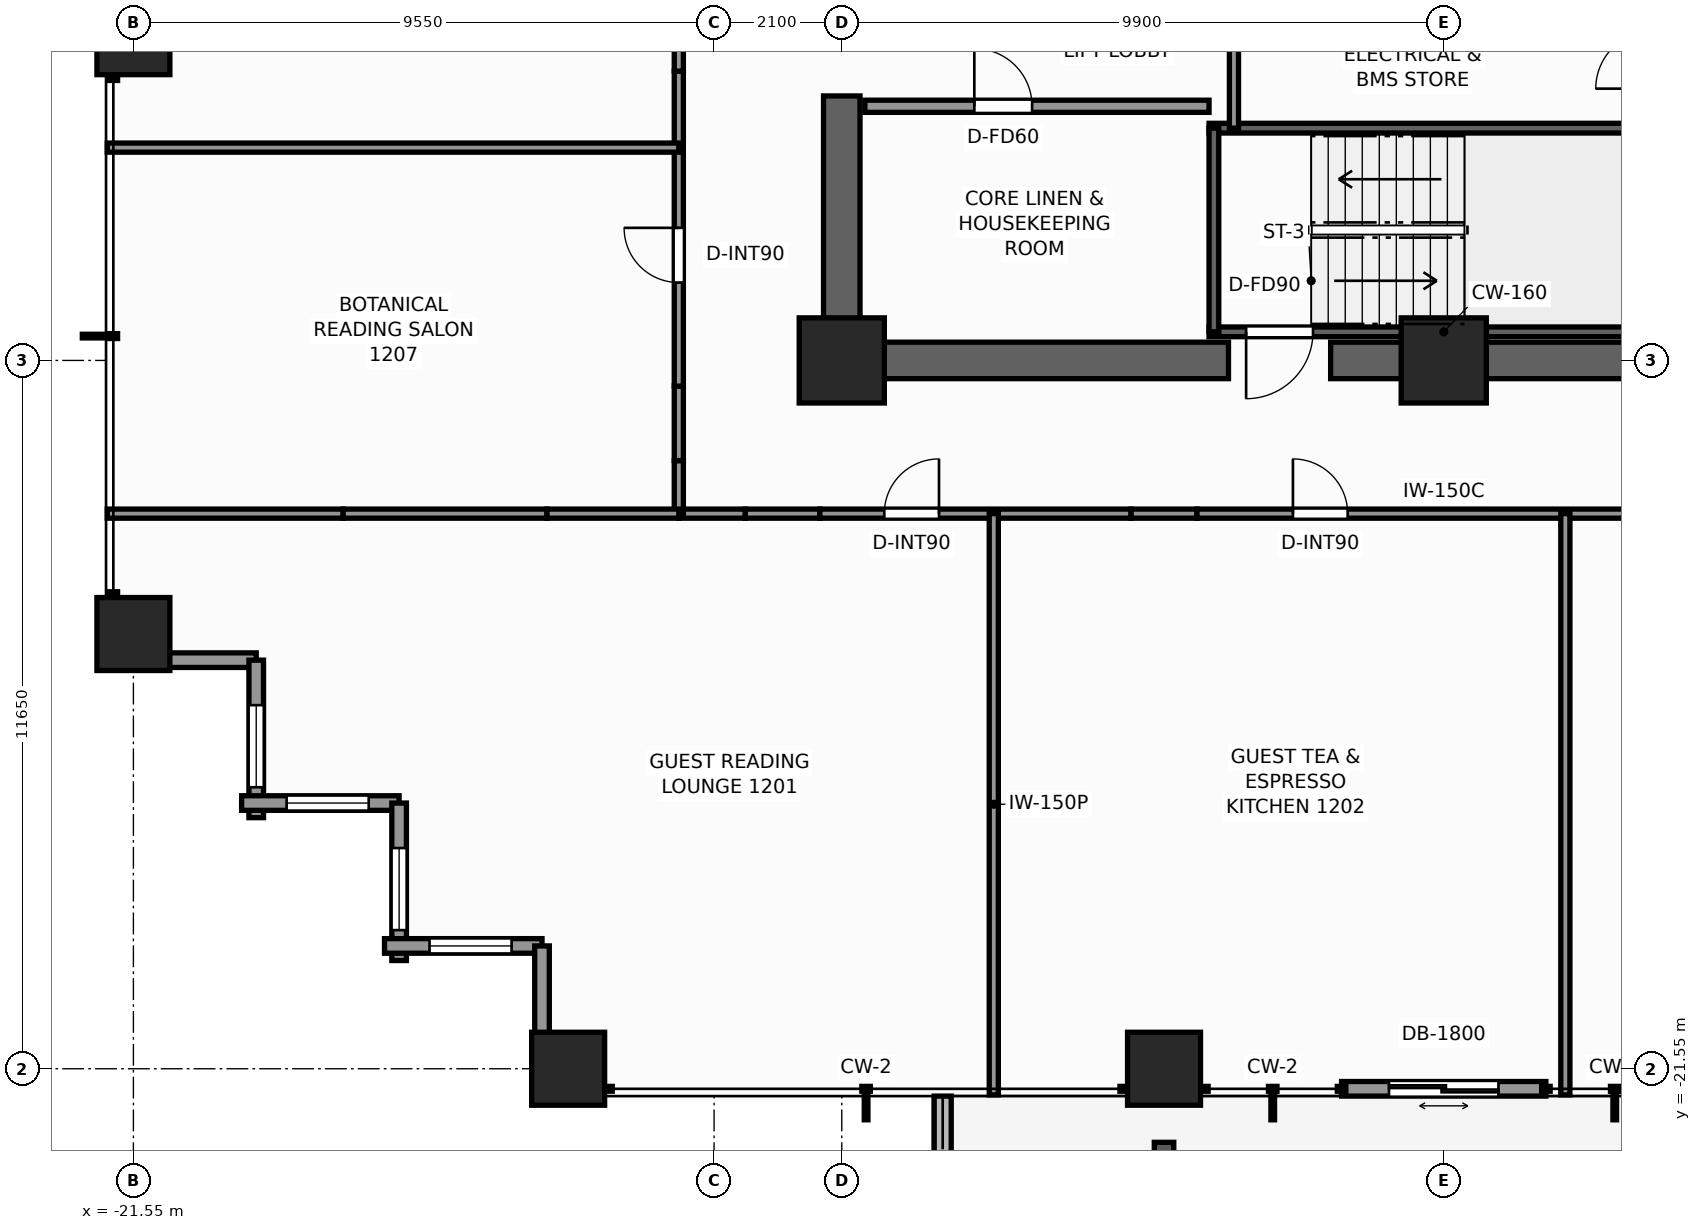
"""IFC4 building model, lengths in metres.
Left out: names, types, materials, properties, quantities, classifications, styles, units other than length and angle.
Written with IfcOpenShell. Run it as: python <this file> out.ifc"""

import sys

from ifc_helpers import new_model, si_unit, direction, frame, frame_2d, origin, origin_2d, place, context, subcontext, project, spatial, rectangle, extrude, element, fill, save


model = new_model("IFC4")
c1 = context("Model", 3, precision=1e-05, world=origin(), true_north=direction((0.0, 1.0)))
c2 = subcontext(c1, "Body", "Model", "MODEL_VIEW")
j1 = project(units=[si_unit("LENGTHUNIT", "METRE"), si_unit("PLANEANGLEUNIT", "RADIAN")], contexts=[c1])
p1 = place(None, origin())
s1 = spatial("IfcSite", under=j1, at=p1, CompositionType="ELEMENT")
p2 = place(p1, origin())
s2 = spatial("IfcBuilding", under=s1, at=p2, CompositionType="ELEMENT")
p3 = place(p2, frame((0.0, 0.0, 43.6)))
s3 = spatial("IfcBuildingStorey", under=s2, at=p3, CompositionType="ELEMENT", Elevation=43.6)
p4 = place(p3, frame((10.2, -9.9, 0.0), z_axis=(0.0, 0.0, 1.0), x_axis=(-1.0, 0.0, 0.0)))
e1 = element("IfcWall", 1, at=p4, inside=s3, PredefinedType="SHEAR", context=c2, shape_type="SweptSolid", body=[
    extrude(rectangle(XDim=12.06, YDim=0.6, at=frame_2d((6.03, 0.0))), origin(), (0.0, 0.0, 1.0), 3.3),
])
p5 = place(p3, frame((-3.54, -9.9, 0.0), z_axis=(0.0, 0.0, 1.0), x_axis=(-1.0, 0.0, 0.0)))
e2 = element("IfcWall", 2, at=p5, inside=s3, PredefinedType="SHEAR", context=c2, shape_type="SweptSolid", body=[
    extrude(rectangle(XDim=6.66, YDim=0.6, at=frame_2d((3.33, 0.0))), origin(), (0.0, 0.0, 1.0), 3.3),
])
p6 = place(p3, frame((-9.9, -9.6, 0.0), z_axis=(0.0, 0.0, 1.0), x_axis=(0.0, 1.0, 0.0)))
e3 = element("IfcWall", 3, at=p6, inside=s3, PredefinedType="SHEAR", context=c2, shape_type="SweptSolid", body=[
    extrude(rectangle(XDim=4.05, YDim=0.6, at=frame_2d((2.025, 0.0))), origin(), (0.0, 0.0, 1.0), 3.3),
])
for number, where, z_axis, x_axis in (
    (4, (-9.9, -9.9, 0.0), (0.0, 0.0, 1.0), (1.0, 0.0, 0.0)),
    (5, (0.0, -9.9, 0.0), (0.0, 0.0, 1.0), (1.0, 0.0, 0.0)),
):
    element("IfcColumn", number, at=place(p3, frame(where, z_axis=z_axis, x_axis=x_axis)), inside=s3, PredefinedType="COLUMN", context=c2, shape_type="SweptSolid", body=[
        extrude(rectangle(XDim=1.4, YDim=1.4, at=origin_2d()), origin(), (0.0, 0.0, 1.0), 3.3),
    ])
for number, where, z_axis, x_axis in (
    (6, (-14.4, -21.55, 0.0), (0.0, 0.0, 1.0), (1.0, 0.0, 0.0)),
    (7, (-4.6, -21.55, 0.0), (0.0, 0.0, 1.0), (1.0, 0.0, 0.0)),
    (8, (-21.55, -14.4, 0.0), (0.0, 0.0, 1.0), (1.0, 0.0, 0.0)),
    (9, (-21.55, -4.6, 0.0), (0.0, 0.0, 1.0), (1.0, 0.0, 0.0)),
):
    element("IfcColumn", number, at=place(p3, frame(where, z_axis=z_axis, x_axis=x_axis)), inside=s3, PredefinedType="COLUMN", context=c2, shape_type="SweptSolid", body=[
        extrude(rectangle(XDim=1.2, YDim=1.2, at=origin_2d()), origin(), (0.0, 0.0, 1.0), 3.3),
    ])
p7 = place(p3, frame((-8.24, -22.0, -0.06), z_axis=(0.0, 0.0, 1.0), x_axis=(0.0, -1.0, 0.0)))
e10 = element("IfcWall", 10, at=p7, inside=s3, PredefinedType="PARAPET", context=c2, shape_type="SweptSolid", body=[
    extrude(rectangle(XDim=1.466, YDim=0.28, at=frame_2d((0.733, 0.0))), origin(), (0.0, 0.0, 1.0), 0.42),
])
p8 = place(p3, frame((1.68, -21.88, 0.0), z_axis=(0.0, 0.0, 1.0), x_axis=(-1.0, 0.0, 0.0)))
e11 = element("IfcWall", 11, at=p8, inside=s3, PredefinedType="STANDARD", context=c2, shape_type="SweptSolid", body=[
    extrude(rectangle(XDim=3.36, YDim=0.24, at=frame_2d((1.68, 0.0))), origin(), (0.0, 0.0, 1.0), 3.06),
])
p9 = place(p8, frame((0.78, 0.0, 0.0)))
e12 = element("IfcOpeningElement", 12, at=p9, cuts=e11, PredefinedType="OPENING", context=c2, shape_type="SweptSolid", body=[
    extrude(rectangle(XDim=1.8, YDim=2.2, at=frame_2d((0.9, 1.1))), frame((0.0, 0.13, 0.0), z_axis=(0.0, -1.0, 0.0), x_axis=(1.0, 0.0, 0.0)), (0.0, 0.0, 1.0), 0.26),
])
p10 = place(p3, frame((-19.53, -14.83, 0.0), z_axis=(0.0, 0.0, 1.0), x_axis=(-1.0, 0.0, 0.0)))
e13 = element("IfcWall", 13, at=p10, inside=s3, PredefinedType="STANDARD", context=c2, shape_type="SweptSolid", body=[
    extrude(rectangle(XDim=2.59, YDim=0.24, at=frame_2d((1.295, 0.0))), origin(), (0.0, 0.0, 1.0), 1.555),
])
p11 = place(p3, frame((-19.53, -17.42, 0.0), z_axis=(0.0, 0.0, 1.0), x_axis=(0.0, 1.0, 0.0)))
e14 = element("IfcWall", 14, at=p11, inside=s3, PredefinedType="STANDARD", context=c2, shape_type="SweptSolid", body=[
    extrude(rectangle(XDim=2.59, YDim=0.24, at=frame_2d((1.295, 0.0))), origin(), (0.0, 0.0, 1.0), 2.439),
])
p12 = place(p11, frame((0.5, 0.0, 0.65)))
e15 = element("IfcOpeningElement", 15, at=p12, cuts=e14, PredefinedType="OPENING", context=c2, shape_type="SweptSolid", body=[
    extrude(rectangle(XDim=1.35, YDim=1.55, at=frame_2d((0.675, 0.775))), frame((0.0, 0.13, 0.0), z_axis=(0.0, -1.0, 0.0), x_axis=(1.0, 0.0, 0.0)), (0.0, 0.0, 1.0), 0.26),
])
p13 = place(p3, frame((-17.18, -17.18, 0.0), z_axis=(0.0, 0.0, 1.0), x_axis=(-1.0, 0.0, 0.0)))
e16 = element("IfcWall", 16, at=p13, inside=s3, PredefinedType="STANDARD", context=c2, shape_type="SweptSolid", body=[
    extrude(rectangle(XDim=2.59, YDim=0.24, at=frame_2d((1.295, 0.0))), origin(), (0.0, 0.0, 1.0), 2.439),
])
p14 = place(p13, frame((0.5, 0.0, 0.65)))
e17 = element("IfcOpeningElement", 17, at=p14, cuts=e16, PredefinedType="OPENING", context=c2, shape_type="SweptSolid", body=[
    extrude(rectangle(XDim=1.35, YDim=1.55, at=frame_2d((0.675, 0.775))), frame((0.0, 0.13, 0.0), z_axis=(0.0, -1.0, 0.0), x_axis=(1.0, 0.0, 0.0)), (0.0, 0.0, 1.0), 0.26),
])
p15 = place(p3, frame((-17.18, -19.77, 0.0), z_axis=(0.0, 0.0, 1.0), x_axis=(0.0, 1.0, 0.0)))
e18 = element("IfcWall", 18, at=p15, inside=s3, PredefinedType="STANDARD", context=c2, shape_type="SweptSolid", body=[
    extrude(rectangle(XDim=2.59, YDim=0.24, at=frame_2d((1.295, 0.0))), origin(), (0.0, 0.0, 1.0), 2.439),
])
p16 = place(p15, frame((0.5, 0.0, 0.65)))
e19 = element("IfcOpeningElement", 19, at=p16, cuts=e18, PredefinedType="OPENING", context=c2, shape_type="SweptSolid", body=[
    extrude(rectangle(XDim=1.35, YDim=1.55, at=frame_2d((0.675, 0.775))), frame((0.0, 0.13, 0.0), z_axis=(0.0, -1.0, 0.0), x_axis=(1.0, 0.0, 0.0)), (0.0, 0.0, 1.0), 0.26),
])
p17 = place(p3, frame((-14.83, -19.53, 0.0), z_axis=(0.0, 0.0, 1.0), x_axis=(-1.0, 0.0, 0.0)))
e20 = element("IfcWall", 20, at=p17, inside=s3, PredefinedType="STANDARD", context=c2, shape_type="SweptSolid", body=[
    extrude(rectangle(XDim=2.59, YDim=0.24, at=frame_2d((1.295, 0.0))), origin(), (0.0, 0.0, 1.0), 2.439),
])
p18 = place(p17, frame((0.5, 0.0, 0.65)))
e21 = element("IfcOpeningElement", 21, at=p18, cuts=e20, PredefinedType="OPENING", context=c2, shape_type="SweptSolid", body=[
    extrude(rectangle(XDim=1.35, YDim=1.55, at=frame_2d((0.675, 0.775))), frame((0.0, 0.13, 0.0), z_axis=(0.0, -1.0, 0.0), x_axis=(1.0, 0.0, 0.0)), (0.0, 0.0, 1.0), 0.26),
])
p19 = place(p3, frame((-14.83, -22.12, 0.0), z_axis=(0.0, 0.0, 1.0), x_axis=(0.0, 1.0, 0.0)))
e22 = element("IfcWall", 22, at=p19, inside=s3, PredefinedType="STANDARD", context=c2, shape_type="SweptSolid", body=[
    extrude(rectangle(XDim=2.59, YDim=0.24, at=frame_2d((1.295, 0.0))), origin(), (0.0, 0.0, 1.0), 1.555),
])
p20 = place(p3, frame((3.86, -9.43, 0.0), z_axis=(0.0, 0.0, 1.0), x_axis=(-1.0, 0.0, 0.0)))
e23 = element("IfcWall", 23, at=p20, inside=s3, PredefinedType="SHEAR", context=c2, shape_type="SweptSolid", body=[
    extrude(rectangle(XDim=7.72, YDim=0.16, at=frame_2d((3.86, 0.0))), origin(), (0.0, 0.0, 1.0), 3.3),
])
p21 = place(p20, frame((6.01, 0.0, 0.0)))
e24 = element("IfcOpeningElement", 24, at=p21, cuts=e23, PredefinedType="OPENING", context=c2, shape_type="SweptSolid", body=[
    extrude(rectangle(XDim=1.1, YDim=2.2, at=frame_2d((0.55, 1.1))), frame((0.0, 0.09, 0.0), z_axis=(0.0, -1.0, 0.0), x_axis=(1.0, 0.0, 0.0)), (0.0, 0.0, 1.0), 0.18),
])
p22 = place(p3, frame((-3.86, -6.08, 0.0), z_axis=(0.0, 0.0, 1.0), x_axis=(1.0, 0.0, 0.0)))
e25 = element("IfcWall", 25, at=p22, inside=s3, PredefinedType="SHEAR", context=c2, shape_type="SweptSolid", body=[
    extrude(rectangle(XDim=7.72, YDim=0.16, at=frame_2d((3.86, 0.0))), origin(), (0.0, 0.0, 1.0), 3.3),
])
p23 = place(p3, frame((-3.78, -9.43, 0.0), z_axis=(0.0, 0.0, 1.0), x_axis=(0.0, 1.0, 0.0)))
e26 = element("IfcWall", 26, at=p23, inside=s3, PredefinedType="SHEAR", context=c2, shape_type="SweptSolid", body=[
    extrude(rectangle(XDim=3.35, YDim=0.16, at=frame_2d((1.675, 0.0))), origin(), (0.0, 0.0, 1.0), 3.3),
])
p24 = place(p3, frame((-9.52, -5.72, 0.0), z_axis=(0.0, 0.0, 1.0), x_axis=(1.0, 0.0, 0.0)))
e27 = element("IfcWall", 27, at=p24, inside=s3, PredefinedType="SOLIDWALL", context=c2, shape_type="SweptSolid", body=[
    extrude(rectangle(XDim=5.66, YDim=0.2, at=frame_2d((2.83, 0.0))), origin(), (0.0, 0.0, 1.0), 3.06),
])
p25 = place(p24, frame((1.8, 0.0, 0.0)))
e28 = element("IfcOpeningElement", 28, at=p25, cuts=e27, PredefinedType="OPENING", context=c2, shape_type="SweptSolid", body=[
    extrude(rectangle(XDim=0.95, YDim=2.06, at=frame_2d((0.475, 1.03))), frame((0.0, 0.11, 0.0), z_axis=(0.0, -1.0, 0.0), x_axis=(1.0, 0.0, 0.0)), (0.0, 0.0, 1.0), 0.22),
])
p26 = place(p3, frame((-3.45, -6.08, 0.0), z_axis=(0.0, 0.0, 1.0), x_axis=(0.0, 1.0, 0.0)))
e29 = element("IfcWall", 29, at=p26, inside=s3, PredefinedType="PARTITIONING", context=c2, shape_type="SweptSolid", body=[
    extrude(rectangle(XDim=2.36, YDim=0.15, at=frame_2d((1.18, 0.0))), origin(), (0.0, 0.0, 1.0), 3.06),
])
p27 = place(p3, frame((-12.58, -12.42, 0.0), z_axis=(0.0, 0.0, 1.0), x_axis=(1.0, 0.0, 0.0)))
e30 = element("IfcWall", 30, at=p27, inside=s3, PredefinedType="PARTITIONING", context=c2, shape_type="SweptSolid", body=[
    extrude(rectangle(XDim=1.094, YDim=0.15, at=frame_2d((0.547, 0.0))), origin(), (0.0, 0.0, 1.0), 3.06),
])
p28 = place(p3, frame((-11.486, -12.42, 0.0), z_axis=(0.0, 0.0, 1.0), x_axis=(1.0, 0.0, 0.0)))
e31 = element("IfcWall", 31, at=p28, inside=s3, PredefinedType="PARTITIONING", context=c2, shape_type="SweptSolid", body=[
    extrude(rectangle(XDim=1.225, YDim=0.15, at=frame_2d((0.612, 0.0))), origin(), (0.0, 0.0, 1.0), 1.545),
])
p29 = place(p3, frame((-10.261, -12.42, 0.0), z_axis=(0.0, 0.0, 1.0), x_axis=(1.0, 0.0, 0.0)))
e32 = element("IfcWall", 32, at=p29, inside=s3, PredefinedType="PARTITIONING", context=c2, shape_type="SweptSolid", body=[
    extrude(rectangle(XDim=5.119, YDim=0.15, at=frame_2d((2.56, 0.0))), origin(), (0.0, 0.0, 1.0), 3.06),
])
p30 = place(p29, frame((1.06, 0.0, 0.0)))
e33 = element("IfcOpeningElement", 33, at=p30, cuts=e32, PredefinedType="OPENING", context=c2, shape_type="SweptSolid", body=[
    extrude(rectangle(XDim=0.9, YDim=2.06, at=frame_2d((0.45, 1.03))), frame((0.0, 0.085, 0.0), z_axis=(0.0, -1.0, 0.0), x_axis=(1.0, 0.0, 0.0)), (0.0, 0.0, 1.0), 0.17),
])
p31 = place(p3, frame((-5.142, -12.42, 0.0), z_axis=(0.0, 0.0, 1.0), x_axis=(1.0, 0.0, 0.0)))
e34 = element("IfcWall", 34, at=p31, inside=s3, PredefinedType="PARTITIONING", context=c2, shape_type="SweptSolid", body=[
    extrude(rectangle(XDim=1.084, YDim=0.15, at=frame_2d((0.542, 0.0))), origin(), (0.0, 0.0, 1.0), 1.545),
])
p32 = place(p3, frame((-4.058, -12.42, 0.0), z_axis=(0.0, 0.0, 1.0), x_axis=(1.0, 0.0, 0.0)))
e35 = element("IfcWall", 35, at=p32, inside=s3, PredefinedType="PARTITIONING", context=c2, shape_type="SweptSolid", body=[
    extrude(rectangle(XDim=8.116, YDim=0.15, at=frame_2d((4.058, 0.0))), origin(), (0.0, 0.0, 1.0), 2.585),
])
p33 = place(p32, frame((1.578, 0.0, 0.0)))
e36 = element("IfcOpeningElement", 36, at=p33, cuts=e35, PredefinedType="OPENING", context=c2, shape_type="SweptSolid", body=[
    extrude(rectangle(XDim=0.9, YDim=2.06, at=frame_2d((0.45, 1.03))), frame((0.0, 0.085, 0.0), z_axis=(0.0, -1.0, 0.0), x_axis=(1.0, 0.0, 0.0)), (0.0, 0.0, 1.0), 0.17),
])
p34 = place(p3, frame((-12.58, -12.42, 0.0), z_axis=(0.0, 0.0, 1.0), x_axis=(0.0, 1.0, 0.0)))
e37 = element("IfcWall", 37, at=p34, inside=s3, PredefinedType="PARTITIONING", context=c2, shape_type="SweptSolid", body=[
    extrude(rectangle(XDim=0.872, YDim=0.15, at=frame_2d((0.436, 0.0))), origin(), (0.0, 0.0, 1.0), 3.06),
])
p35 = place(p3, frame((-12.58, -11.548, 0.0), z_axis=(0.0, 0.0, 1.0), x_axis=(0.0, 1.0, 0.0)))
e38 = element("IfcWall", 38, at=p35, inside=s3, PredefinedType="PARTITIONING", context=c2, shape_type="SweptSolid", body=[
    extrude(rectangle(XDim=1.225, YDim=0.15, at=frame_2d((0.612, 0.0))), origin(), (0.0, 0.0, 1.0), 1.545),
])
p36 = place(p3, frame((-12.58, -10.323, 0.0), z_axis=(0.0, 0.0, 1.0), x_axis=(0.0, 1.0, 0.0)))
e39 = element("IfcWall", 39, at=p36, inside=s3, PredefinedType="PARTITIONING", context=c2, shape_type="SweptSolid", body=[
    extrude(rectangle(XDim=5.181, YDim=0.15, at=frame_2d((2.59, 0.0))), origin(), (0.0, 0.0, 1.0), 3.06),
])
p37 = place(p36, frame((1.703, 0.0, 0.0)))
e40 = element("IfcOpeningElement", 40, at=p37, cuts=e39, PredefinedType="OPENING", context=c2, shape_type="SweptSolid", body=[
    extrude(rectangle(XDim=0.9, YDim=2.06, at=frame_2d((0.45, 1.03))), frame((0.0, 0.085, 0.0), z_axis=(0.0, -1.0, 0.0), x_axis=(1.0, 0.0, 0.0)), (0.0, 0.0, 1.0), 0.17),
])
p38 = place(p3, frame((-12.58, -5.142, 0.0), z_axis=(0.0, 0.0, 1.0), x_axis=(0.0, 1.0, 0.0)))
e41 = element("IfcWall", 41, at=p38, inside=s3, PredefinedType="PARTITIONING", context=c2, shape_type="SweptSolid", body=[
    extrude(rectangle(XDim=1.084, YDim=0.15, at=frame_2d((0.542, 0.0))), origin(), (0.0, 0.0, 1.0), 1.545),
])
p39 = place(p3, frame((-21.98, -12.42, 0.0), z_axis=(0.0, 0.0, 1.0), x_axis=(1.0, 0.0, 0.0)))
e42 = element("IfcWall", 42, at=p39, inside=s3, PredefinedType="PARTITIONING", context=c2, shape_type="SweptSolid", body=[
    extrude(rectangle(XDim=3.88, YDim=0.15, at=frame_2d((1.94, 0.0))), origin(), (0.0, 0.0, 1.0), 2.429),
])
p40 = place(p3, frame((-18.1, -12.42, 0.0), z_axis=(0.0, 0.0, 1.0), x_axis=(1.0, 0.0, 0.0)))
e43 = element("IfcWall", 43, at=p40, inside=s3, PredefinedType="PARTITIONING", context=c2, shape_type="SweptSolid", body=[
    extrude(rectangle(XDim=3.352, YDim=0.15, at=frame_2d((1.676, 0.0))), origin(), (0.0, 0.0, 1.0), 1.545),
])
p41 = place(p3, frame((-14.748, -12.42, 0.0), z_axis=(0.0, 0.0, 1.0), x_axis=(1.0, 0.0, 0.0)))
e44 = element("IfcWall", 44, at=p41, inside=s3, PredefinedType="PARTITIONING", context=c2, shape_type="SweptSolid", body=[
    extrude(rectangle(XDim=2.168, YDim=0.15, at=frame_2d((1.084, 0.0))), origin(), (0.0, 0.0, 1.0), 3.06),
])
for number, where, z_axis, x_axis in (
    (45, (-7.4, -21.98, 0.0), (0.0, 0.0, 1.0), (0.0, 1.0, 0.0)),
    (46, (2.0, -21.98, 0.0), (0.0, 0.0, 1.0), (0.0, 1.0, 0.0)),
):
    element("IfcWall", number, at=place(p3, frame(where, z_axis=z_axis, x_axis=x_axis)), inside=s3, PredefinedType="PARTITIONING", context=c2, shape_type="SweptSolid", body=[
        extrude(rectangle(XDim=9.56, YDim=0.15, at=frame_2d((4.78, 0.0))), origin(), (0.0, 0.0, 1.0), 2.429),
    ])
p42 = place(p3, frame((-21.98, -6.4, 0.0), z_axis=(0.0, 0.0, 1.0), x_axis=(1.0, 0.0, 0.0)))
e47 = element("IfcWall", 47, at=p42, inside=s3, PredefinedType="PARTITIONING", context=c2, shape_type="SweptSolid", body=[
    extrude(rectangle(XDim=9.4, YDim=0.15, at=frame_2d((4.7, 0.0))), origin(), (0.0, 0.0, 1.0), 2.429),
])
p43 = place(p9, origin())
e48 = element("IfcDoor", 48, at=p43, inside=s3, OperationType="DOUBLE_DOOR_SLIDING", PredefinedType="DOOR", context=c2, shape_type="SweptSolid", body=[
    extrude(rectangle(XDim=1.8, YDim=2.2, at=frame_2d((0.9, 1.1))), frame((0.0, 0.025, 0.0), z_axis=(0.0, -1.0, 0.0), x_axis=(1.0, 0.0, 0.0)), (0.0, 0.0, 1.0), 0.05),
])
fill(e12, e48)
p44 = place(p12, origin())
e49 = element("IfcWindow", 49, at=p44, inside=s3, PartitioningType="SINGLE_PANEL", PredefinedType="WINDOW", context=c2, shape_type="SweptSolid", body=[
    extrude(rectangle(XDim=1.35, YDim=1.55, at=frame_2d((0.675, 0.775))), frame((0.0, 0.03, 0.0), z_axis=(0.0, -1.0, 0.0), x_axis=(1.0, 0.0, 0.0)), (0.0, 0.0, 1.0), 0.06),
])
fill(e15, e49)
p45 = place(p14, origin())
e50 = element("IfcWindow", 50, at=p45, inside=s3, PartitioningType="SINGLE_PANEL", PredefinedType="WINDOW", context=c2, shape_type="SweptSolid", body=[
    extrude(rectangle(XDim=1.35, YDim=1.55, at=frame_2d((0.675, 0.775))), frame((0.0, 0.03, 0.0), z_axis=(0.0, -1.0, 0.0), x_axis=(1.0, 0.0, 0.0)), (0.0, 0.0, 1.0), 0.06),
])
fill(e17, e50)
p46 = place(p16, origin())
e51 = element("IfcWindow", 51, at=p46, inside=s3, PartitioningType="SINGLE_PANEL", PredefinedType="WINDOW", context=c2, shape_type="SweptSolid", body=[
    extrude(rectangle(XDim=1.35, YDim=1.55, at=frame_2d((0.675, 0.775))), frame((0.0, 0.03, 0.0), z_axis=(0.0, -1.0, 0.0), x_axis=(1.0, 0.0, 0.0)), (0.0, 0.0, 1.0), 0.06),
])
fill(e19, e51)
p47 = place(p18, origin())
e52 = element("IfcWindow", 52, at=p47, inside=s3, PartitioningType="SINGLE_PANEL", PredefinedType="WINDOW", context=c2, shape_type="SweptSolid", body=[
    extrude(rectangle(XDim=1.35, YDim=1.55, at=frame_2d((0.675, 0.775))), frame((0.0, 0.03, 0.0), z_axis=(0.0, -1.0, 0.0), x_axis=(1.0, 0.0, 0.0)), (0.0, 0.0, 1.0), 0.06),
])
fill(e21, e52)
p48 = place(p21, origin())
e53 = element("IfcDoor", 53, at=p48, inside=s3, OperationType="SINGLE_SWING_RIGHT", PredefinedType="DOOR", context=c2, shape_type="SweptSolid", body=[
    extrude(rectangle(XDim=1.1, YDim=2.2, at=frame_2d((0.55, 1.1))), frame((0.0, 0.025, 0.0), z_axis=(0.0, -1.0, 0.0), x_axis=(1.0, 0.0, 0.0)), (0.0, 0.0, 1.0), 0.05),
])
fill(e24, e53)
p49 = place(p25, origin())
e54 = element("IfcDoor", 54, at=p49, inside=s3, OperationType="SINGLE_SWING_LEFT", PredefinedType="DOOR", context=c2, shape_type="SweptSolid", body=[
    extrude(rectangle(XDim=0.95, YDim=2.06, at=frame_2d((0.475, 1.03))), frame((0.0, 0.025, 0.0), z_axis=(0.0, -1.0, 0.0), x_axis=(1.0, 0.0, 0.0)), (0.0, 0.0, 1.0), 0.05),
])
fill(e28, e54)
p50 = place(p30, origin())
e55 = element("IfcDoor", 55, at=p50, inside=s3, OperationType="SINGLE_SWING_RIGHT", PredefinedType="DOOR", context=c2, shape_type="SweptSolid", body=[
    extrude(rectangle(XDim=0.9, YDim=2.06, at=frame_2d((0.45, 1.03))), frame((0.0, 0.025, 0.0), z_axis=(0.0, -1.0, 0.0), x_axis=(1.0, 0.0, 0.0)), (0.0, 0.0, 1.0), 0.05),
])
fill(e33, e55)
p51 = place(p33, origin())
e56 = element("IfcDoor", 56, at=p51, inside=s3, OperationType="SINGLE_SWING_LEFT", PredefinedType="DOOR", context=c2, shape_type="SweptSolid", body=[
    extrude(rectangle(XDim=0.9, YDim=2.06, at=frame_2d((0.45, 1.03))), frame((0.0, 0.025, 0.0), z_axis=(0.0, -1.0, 0.0), x_axis=(1.0, 0.0, 0.0)), (0.0, 0.0, 1.0), 0.05),
])
fill(e36, e56)
p52 = place(p37, origin())
e57 = element("IfcDoor", 57, at=p52, inside=s3, OperationType="SINGLE_SWING_RIGHT", PredefinedType="DOOR", context=c2, shape_type="SweptSolid", body=[
    extrude(rectangle(XDim=0.9, YDim=2.06, at=frame_2d((0.45, 1.03))), frame((0.0, 0.025, 0.0), z_axis=(0.0, -1.0, 0.0), x_axis=(1.0, 0.0, 0.0)), (0.0, 0.0, 1.0), 0.05),
])
fill(e40, e57)
save(model, sys.argv[1])
